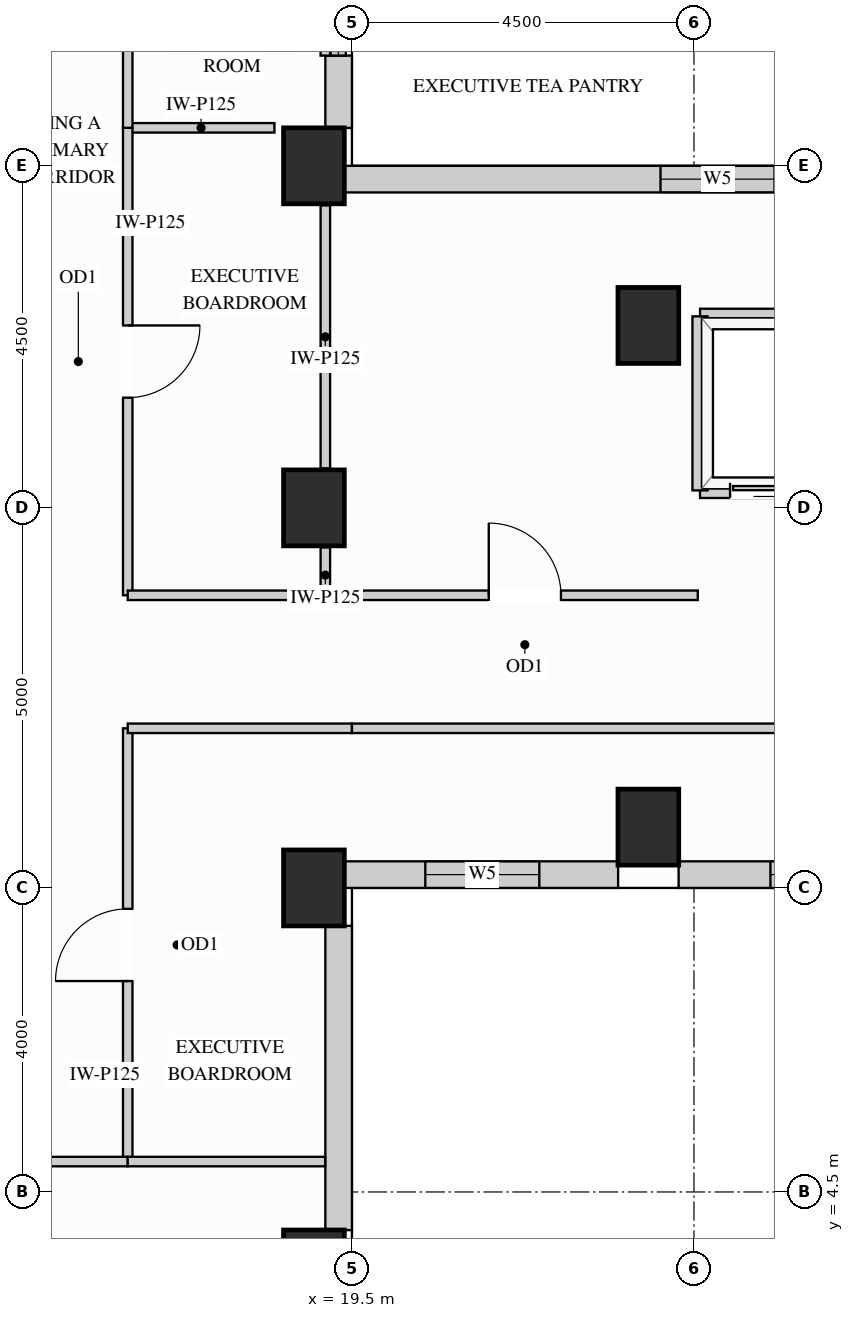
"""IFC4 building model, lengths in metres.
Left out: names, types, materials, properties, quantities, classifications, styles, units other than length and angle.
Written with IfcOpenShell. Run it as: python <this file> out.ifc"""

import sys

from ifc_helpers import new_model, si_unit, direction, frame, frame_2d, origin, origin_2d, place, context, subcontext, project, spatial, rectangle, extrude, source, transform, mapped, element, fill, save


model = new_model("IFC4")
c1 = context("Model", 3, precision=1e-05, world=origin(), true_north=direction((0.0, 1.0)))
c2 = subcontext(c1, "Body", "Model", "MODEL_VIEW")
j1 = project(units=[si_unit("LENGTHUNIT", "METRE"), si_unit("PLANEANGLEUNIT", "RADIAN")], contexts=[c1])
p1 = place(None, origin())
s1 = spatial("IfcSite", under=j1, at=p1, CompositionType="ELEMENT")
p2 = place(p1, origin())
s2 = spatial("IfcBuilding", under=s1, at=p2, CompositionType="ELEMENT")
p3 = place(p2, frame((0.0, 0.0, 153.9)))
s3 = spatial("IfcBuildingStorey", under=s2, at=p3, CompositionType="ELEMENT", Elevation=153.9)
m1 = source(origin(), c2, "Body", "SweptSolid", [
    extrude(rectangle(XDim=0.8, YDim=1.0, at=origin_2d()), origin(), (0.0, 0.0, 1.0), 3.4),
])
for number, where, z_axis, x_axis in (
    (1, (19.0, 13.5, 0.0), (0.0, 0.0, 1.0), (1.0, 0.0, 0.0)),
    (2, (19.0, 18.0, 0.0), (0.0, 0.0, 1.0), (1.0, 0.0, 0.0)),
    (3, (19.0, 3.5, 0.0), (0.0, 0.0, 1.0), (1.0, 0.0, 0.0)),
    (4, (19.0, 8.5, 0.0), (0.0, 0.0, 1.0), (1.0, 0.0, 0.0)),
    (5, (23.4, 15.9, 0.0), (0.0, 0.0, 1.0), (1.0, 0.0, 0.0)),
    (6, (23.4, 9.3, 0.0), (0.0, 0.0, 1.0), (1.0, 0.0, 0.0)),
):
    element("IfcColumn", number, at=place(p3, frame(where, z_axis=z_axis, x_axis=x_axis)), inside=s3, PredefinedType="COLUMN", context=c2, shape_type="MappedRepresentation", body=[
        mapped(m1, transform((0.0, 0.0, 0.0), x_axis=(1.0, 0.0, 0.0), y_axis=(0.0, 1.0, 0.0), z_axis=(0.0, 0.0, 1.0))),
    ])
m2 = source(origin(), c2, "Body", "SweptSolid", [
    extrude(rectangle(XDim=4.004, YDim=0.35, at=frame_2d((2.002, 0.0))), origin(), (0.0, 0.0, 1.0), 2.612),
])
p4 = place(p3, frame((19.325, 3.998, 0.0), z_axis=(0.0, 0.0, 1.0), x_axis=(0.0, 1.0, 0.0)))
e7 = element("IfcWall", 7, at=p4, inside=s3, PredefinedType="SOLIDWALL", context=c2, shape_type="MappedRepresentation", body=[
    mapped(m2, transform((0.0, 0.0, 0.0), x_axis=(1.0, 0.0, 0.0), y_axis=(0.0, 1.0, 0.0), z_axis=(0.0, 0.0, 1.0))),
])
p5 = place(p3, frame((19.398, 8.675, 0.0), z_axis=(0.0, 0.0, 1.0), x_axis=(1.0, 0.0, 0.0)))
e8 = element("IfcWall", 8, at=p5, inside=s3, PredefinedType="SOLIDWALL", context=c2, shape_type="SweptSolid", body=[
    extrude(rectangle(XDim=3.604, YDim=0.35, at=frame_2d((1.802, 0.0))), origin(), (0.0, 0.0, 1.0), 3.385),
])
p6 = place(p5, frame((1.067, 0.0, 0.78)))
e9 = element("IfcOpeningElement", 9, at=p6, cuts=e8, PredefinedType="OPENING", context=c2, shape_type="SweptSolid", body=[
    extrude(rectangle(XDim=1.5, YDim=2.0, at=frame_2d((0.75, 1.0))), frame((0.0, 0.185, 0.0), z_axis=(0.0, -1.0, 0.0), x_axis=(1.0, 0.0, 0.0)), (0.0, 0.0, 1.0), 0.37),
])
p7 = place(p3, frame((23.798, 8.675, 0.0), z_axis=(0.0, 0.0, 1.0), x_axis=(1.0, 0.0, 0.0)))
e10 = element("IfcWall", 10, at=p7, inside=s3, PredefinedType="SOLIDWALL", context=c2, shape_type="SweptSolid", body=[
    extrude(rectangle(XDim=6.304, YDim=0.35, at=frame_2d((3.152, 0.0))), origin(), (0.0, 0.0, 1.0), 3.385),
])
p8 = place(p7, frame((1.208, 0.0, 0.78)))
e11 = element("IfcOpeningElement", 11, at=p8, cuts=e10, PredefinedType="OPENING", context=c2, shape_type="SweptSolid", body=[
    extrude(rectangle(XDim=1.5, YDim=2.0, at=frame_2d((0.75, 1.0))), frame((0.0, 0.185, 0.0), z_axis=(0.0, -1.0, 0.0), x_axis=(1.0, 0.0, 0.0)), (0.0, 0.0, 1.0), 0.37),
])
p9 = place(p7, frame((3.596, 0.0, 0.78)))
e12 = element("IfcOpeningElement", 12, at=p9, cuts=e10, PredefinedType="OPENING", context=c2, shape_type="SweptSolid", body=[
    extrude(rectangle(XDim=1.5, YDim=2.0, at=frame_2d((0.75, 1.0))), frame((0.0, 0.185, 0.0), z_axis=(0.0, -1.0, 0.0), x_axis=(1.0, 0.0, 0.0)), (0.0, 0.0, 1.0), 0.37),
])
p10 = place(p3, frame((34.502, 17.825, 0.0), z_axis=(0.0, 0.0, 1.0), x_axis=(-1.0, 0.0, 0.0)))
e13 = element("IfcWall", 13, at=p10, inside=s3, PredefinedType="SOLIDWALL", context=c2, shape_type="SweptSolid", body=[
    extrude(rectangle(XDim=15.104, YDim=0.35, at=frame_2d((7.552, 0.0))), origin(), (0.0, 0.0, 1.0), 3.385),
])
p11 = place(p10, frame((4.131, 0.0, 0.78)))
e14 = element("IfcOpeningElement", 14, at=p11, cuts=e13, PredefinedType="OPENING", context=c2, shape_type="SweptSolid", body=[
    extrude(rectangle(XDim=1.5, YDim=2.0, at=frame_2d((0.75, 1.0))), frame((0.0, 0.185, 0.0), z_axis=(0.0, -1.0, 0.0), x_axis=(1.0, 0.0, 0.0)), (0.0, 0.0, 1.0), 0.37),
])
p12 = place(p10, frame((9.442, 0.0, 0.78)))
e15 = element("IfcOpeningElement", 15, at=p12, cuts=e13, PredefinedType="OPENING", context=c2, shape_type="SweptSolid", body=[
    extrude(rectangle(XDim=1.5, YDim=2.0, at=frame_2d((0.75, 1.0))), frame((0.0, 0.185, 0.0), z_axis=(0.0, -1.0, 0.0), x_axis=(1.0, 0.0, 0.0)), (0.0, 0.0, 1.0), 0.37),
])
m3 = source(origin(), c2, "Body", "SweptSolid", [
    extrude(rectangle(XDim=0.952, YDim=0.35, at=frame_2d((0.476, 0.0))), origin(), (0.0, 0.0, 1.0), 2.612),
])
p13 = place(p3, frame((19.325, 18.498, 0.0), z_axis=(0.0, 0.0, 1.0), x_axis=(0.0, 1.0, 0.0)))
e16 = element("IfcWall", 16, at=p13, inside=s3, PredefinedType="SOLIDWALL", context=c2, shape_type="MappedRepresentation", body=[
    mapped(m3, transform((0.0, 0.0, 0.0), x_axis=(1.0, 0.0, 0.0), y_axis=(0.0, 1.0, 0.0), z_axis=(0.0, 0.0, 1.0))),
])
m4 = source(origin(), c2, "Body", "SweptSolid", [
    extrude(rectangle(XDim=1.93, YDim=0.125, at=frame_2d((0.965, 0.0))), origin(), (0.0, 0.0, 1.0), 3.385),
])
p14 = place(p3, frame((16.55, 18.5, 0.0), z_axis=(0.0, 0.0, 1.0), x_axis=(1.0, 0.0, 0.0)))
e17 = element("IfcWall", 17, at=p14, inside=s3, PredefinedType="PARTITIONING", context=c2, shape_type="MappedRepresentation", body=[
    mapped(m4, transform((0.0, 0.0, 0.0), x_axis=(1.0, 0.0, 0.0), y_axis=(0.0, 1.0, 0.0), z_axis=(0.0, 0.0, 1.0))),
])
m5 = source(origin(), c2, "Body", "SweptSolid", [
    extrude(rectangle(XDim=0.63, YDim=0.125, at=frame_2d((0.315, 0.0))), origin(), (0.0, 0.0, 1.0), 2.773),
])
p15 = place(p3, frame((19.15, 12.35, 0.0), z_axis=(0.0, 0.0, 1.0), x_axis=(0.0, 1.0, 0.0)))
e18 = element("IfcWall", 18, at=p15, inside=s3, PredefinedType="PARTITIONING", context=c2, shape_type="MappedRepresentation", body=[
    mapped(m5, transform((0.0, 0.0, 0.0), x_axis=(1.0, 0.0, 0.0), y_axis=(0.0, 1.0, 0.0), z_axis=(0.0, 0.0, 1.0))),
])
m6 = source(origin(), c2, "Body", "SweptSolid", [
    extrude(rectangle(XDim=3.46, YDim=0.125, at=frame_2d((1.73, 0.0))), origin(), (0.0, 0.0, 1.0), 2.773),
])
p16 = place(p3, frame((19.15, 14.02, 0.0), z_axis=(0.0, 0.0, 1.0), x_axis=(0.0, 1.0, 0.0)))
e19 = element("IfcWall", 19, at=p16, inside=s3, PredefinedType="PARTITIONING", context=c2, shape_type="MappedRepresentation", body=[
    mapped(m6, transform((0.0, 0.0, 0.0), x_axis=(1.0, 0.0, 0.0), y_axis=(0.0, 1.0, 0.0), z_axis=(0.0, 0.0, 1.0))),
])
m7 = source(origin(), c2, "Body", "SweptSolid", [
    extrude(rectangle(XDim=2.05, YDim=0.125, at=frame_2d((1.025, 0.0))), origin(), (0.0, 0.0, 1.0), 2.612),
])
p17 = place(p3, frame((19.15, 19.45, 0.0), z_axis=(0.0, 0.0, 1.0), x_axis=(0.0, 1.0, 0.0)))
e20 = element("IfcWall", 20, at=p17, inside=s3, PredefinedType="PARTITIONING", context=c2, shape_type="MappedRepresentation", body=[
    mapped(m7, transform((0.0, 0.0, 0.0), x_axis=(1.0, 0.0, 0.0), y_axis=(0.0, 1.0, 0.0), z_axis=(0.0, 0.0, 1.0))),
])
p18 = place(p3, frame((16.55, 12.35, 0.0), z_axis=(0.0, 0.0, 1.0), x_axis=(0.0, 1.0, 0.0)))
e21 = element("IfcWall", 21, at=p18, inside=s3, PredefinedType="PARTITIONING", context=c2, shape_type="SweptSolid", body=[
    extrude(rectangle(XDim=6.15, YDim=0.125, at=frame_2d((3.075, 0.0))), origin(), (0.0, 0.0, 1.0), 3.385),
])
p19 = place(p18, frame((2.6, 0.0, 0.0)))
e22 = element("IfcOpeningElement", 22, at=p19, cuts=e21, PredefinedType="OPENING", context=c2, shape_type="SweptSolid", body=[
    extrude(rectangle(XDim=0.95, YDim=2.15, at=frame_2d((0.475, 1.075))), frame((0.0, 0.073, 0.0), z_axis=(0.0, -1.0, 0.0), x_axis=(1.0, 0.0, 0.0)), (0.0, 0.0, 1.0), 0.145),
])
p20 = place(p3, frame((16.55, 18.5, 0.0), z_axis=(0.0, 0.0, 1.0), x_axis=(0.0, 1.0, 0.0)))
e23 = element("IfcWall", 23, at=p20, inside=s3, PredefinedType="PARTITIONING", context=c2, shape_type="SweptSolid", body=[
    extrude(rectangle(XDim=4.85, YDim=0.125, at=frame_2d((2.425, 0.0))), origin(), (0.0, 0.0, 1.0), 3.385),
])
p21 = place(p20, frame((1.95, 0.0, 0.0)))
e24 = element("IfcOpeningElement", 24, at=p21, cuts=e23, PredefinedType="OPENING", context=c2, shape_type="SweptSolid", body=[
    extrude(rectangle(XDim=0.95, YDim=2.15, at=frame_2d((0.475, 1.075))), frame((0.0, 0.073, 0.0), z_axis=(0.0, -1.0, 0.0), x_axis=(1.0, 0.0, 0.0)), (0.0, 0.0, 1.0), 0.145),
])
p22 = place(p3, frame((16.55, 4.9, 0.0), z_axis=(0.0, 0.0, 1.0), x_axis=(0.0, 1.0, 0.0)))
e25 = element("IfcWall", 25, at=p22, inside=s3, PredefinedType="PARTITIONING", context=c2, shape_type="SweptSolid", body=[
    extrude(rectangle(XDim=5.7, YDim=0.125, at=frame_2d((2.85, 0.0))), origin(), (0.0, 0.0, 1.0), 3.385),
])
p23 = place(p22, frame((2.375, 0.0, 0.0)))
e26 = element("IfcOpeningElement", 26, at=p23, cuts=e25, PredefinedType="OPENING", context=c2, shape_type="SweptSolid", body=[
    extrude(rectangle(XDim=0.95, YDim=2.15, at=frame_2d((0.475, 1.075))), frame((0.0, 0.073, 0.0), z_axis=(0.0, -1.0, 0.0), x_axis=(1.0, 0.0, 0.0)), (0.0, 0.0, 1.0), 0.145),
])
m8 = source(origin(), c2, "Body", "SweptSolid", [
    extrude(rectangle(XDim=2.95, YDim=0.125, at=frame_2d((1.475, 0.0))), origin(), (0.0, 0.0, 1.0), 3.385),
])
p24 = place(p3, frame((16.55, 12.35, 0.0), z_axis=(0.0, 0.0, 1.0), x_axis=(1.0, 0.0, 0.0)))
e27 = element("IfcWall", 27, at=p24, inside=s3, PredefinedType="PARTITIONING", context=c2, shape_type="MappedRepresentation", body=[
    mapped(m8, transform((0.0, 0.0, 0.0), x_axis=(1.0, 0.0, 0.0), y_axis=(0.0, 1.0, 0.0), z_axis=(0.0, 0.0, 1.0))),
])
p25 = place(p3, frame((19.5, 12.35, 0.0), z_axis=(0.0, 0.0, 1.0), x_axis=(1.0, 0.0, 0.0)))
e28 = element("IfcWall", 28, at=p25, inside=s3, PredefinedType="PARTITIONING", context=c2, shape_type="SweptSolid", body=[
    extrude(rectangle(XDim=4.55, YDim=0.125, at=frame_2d((2.275, 0.0))), origin(), (0.0, 0.0, 1.0), 3.385),
])
p26 = place(p25, frame((1.8, 0.0, 0.0)))
e29 = element("IfcOpeningElement", 29, at=p26, cuts=e28, PredefinedType="OPENING", context=c2, shape_type="SweptSolid", body=[
    extrude(rectangle(XDim=0.95, YDim=2.15, at=frame_2d((0.475, 1.075))), frame((0.0, 0.073, 0.0), z_axis=(0.0, -1.0, 0.0), x_axis=(1.0, 0.0, 0.0)), (0.0, 0.0, 1.0), 0.145),
])
p27 = place(p3, frame((16.55, 10.6, 0.0), z_axis=(0.0, 0.0, 1.0), x_axis=(1.0, 0.0, 0.0)))
e30 = element("IfcWall", 30, at=p27, inside=s3, PredefinedType="PARTITIONING", context=c2, shape_type="MappedRepresentation", body=[
    mapped(m8, transform((0.0, 0.0, 0.0), x_axis=(1.0, 0.0, 0.0), y_axis=(0.0, 1.0, 0.0), z_axis=(0.0, 0.0, 1.0))),
])
p28 = place(p3, frame((19.5, 10.6, 0.0), z_axis=(0.0, 0.0, 1.0), x_axis=(1.0, 0.0, 0.0)))
e31 = element("IfcWall", 31, at=p28, inside=s3, PredefinedType="PARTITIONING", context=c2, shape_type="SweptSolid", body=[
    extrude(rectangle(XDim=14.9, YDim=0.125, at=frame_2d((7.45, 0.0))), origin(), (0.0, 0.0, 1.0), 3.385),
])
p29 = place(p28, frame((6.975, 0.0, 0.0)))
e32 = element("IfcOpeningElement", 32, at=p29, cuts=e31, PredefinedType="OPENING", context=c2, shape_type="SweptSolid", body=[
    extrude(rectangle(XDim=0.95, YDim=2.15, at=frame_2d((0.475, 1.075))), frame((0.0, 0.073, 0.0), z_axis=(0.0, -1.0, 0.0), x_axis=(1.0, 0.0, 0.0)), (0.0, 0.0, 1.0), 0.145),
])
p30 = place(p3, frame((10.213, 4.9, 0.0), z_axis=(0.0, 0.0, 1.0), x_axis=(1.0, 0.0, 0.0)))
e33 = element("IfcWall", 33, at=p30, inside=s3, PredefinedType="PARTITIONING", context=c2, shape_type="SweptSolid", body=[
    extrude(rectangle(XDim=6.337, YDim=0.125, at=frame_2d((3.168, 0.0))), origin(), (0.0, 0.0, 1.0), 2.848),
])
p31 = place(p30, frame((2.694, 0.0, 0.0)))
e34 = element("IfcOpeningElement", 34, at=p31, cuts=e33, PredefinedType="OPENING", context=c2, shape_type="SweptSolid", body=[
    extrude(rectangle(XDim=0.95, YDim=2.15, at=frame_2d((0.475, 1.075))), frame((0.0, 0.073, 0.0), z_axis=(0.0, -1.0, 0.0), x_axis=(1.0, 0.0, 0.0)), (0.0, 0.0, 1.0), 0.145),
])
m9 = source(origin(), c2, "Body", "SweptSolid", [
    extrude(rectangle(XDim=2.598, YDim=0.125, at=frame_2d((1.299, 0.0))), origin(), (0.0, 0.0, 1.0), 2.848),
])
p32 = place(p3, frame((16.55, 4.9, 0.0), z_axis=(0.0, 0.0, 1.0), x_axis=(1.0, 0.0, 0.0)))
e35 = element("IfcWall", 35, at=p32, inside=s3, PredefinedType="PARTITIONING", context=c2, shape_type="MappedRepresentation", body=[
    mapped(m9, transform((0.0, 0.0, 0.0), x_axis=(1.0, 0.0, 0.0), y_axis=(0.0, 1.0, 0.0), z_axis=(0.0, 0.0, 1.0))),
])
m10 = source(origin(), c2, "Body", "SweptSolid", [
    extrude(rectangle(XDim=1.89, YDim=0.2, at=frame_2d((0.945, 0.0))), origin(), (0.0, 0.0, 1.0), 2.773),
])
p33 = place(p3, frame((24.08, 16.02, 0.0), z_axis=(0.0, 0.0, 1.0), x_axis=(1.0, 0.0, 0.0)))
e36 = element("IfcWall", 36, at=p33, inside=s3, PredefinedType="PARTITIONING", context=c2, shape_type="MappedRepresentation", body=[
    mapped(m10, transform((0.0, 0.0, 0.0), x_axis=(1.0, 0.0, 0.0), y_axis=(0.0, 1.0, 0.0), z_axis=(0.0, 0.0, 1.0))),
])
p34 = place(p3, frame((24.08, 13.73, 0.0), z_axis=(0.0, 0.0, 1.0), x_axis=(1.0, 0.0, 0.0)))
e37 = element("IfcWall", 37, at=p34, inside=s3, PredefinedType="PARTITIONING", context=c2, shape_type="SweptSolid", body=[
    extrude(rectangle(XDim=1.89, YDim=0.2, at=frame_2d((0.945, 0.0))), origin(), (0.0, 0.0, 1.0), 2.466),
])
p35 = place(p34, frame((0.395, 0.0, 0.0)))
e38 = element("IfcOpeningElement", 38, at=p35, cuts=e37, PredefinedType="OPENING", context=c2, shape_type="SweptSolid", body=[
    extrude(rectangle(XDim=1.1, YDim=2.2, at=frame_2d((0.55, 1.1))), frame((0.0, 0.11, 0.0), z_axis=(0.0, -1.0, 0.0), x_axis=(1.0, 0.0, 0.0)), (0.0, 0.0, 1.0), 0.22),
])
m11 = source(origin(), c2, "Body", "SweptSolid", [
    extrude(rectangle(XDim=2.29, YDim=0.2, at=frame_2d((1.145, 0.0))), origin(), (0.0, 0.0, 1.0), 3.385),
])
p36 = place(p3, frame((24.08, 13.73, 0.0), z_axis=(0.0, 0.0, 1.0), x_axis=(0.0, 1.0, 0.0)))
e39 = element("IfcWall", 39, at=p36, inside=s3, PredefinedType="PARTITIONING", context=c2, shape_type="MappedRepresentation", body=[
    mapped(m11, transform((0.0, 0.0, 0.0), x_axis=(1.0, 0.0, 0.0), y_axis=(0.0, 1.0, 0.0), z_axis=(0.0, 0.0, 1.0))),
])
m12 = source(origin(), c2, "Body", "SweptSolid", [
    extrude(rectangle(XDim=1.1, YDim=2.2, at=frame_2d((0.55, 1.1))), frame((0.0, 0.025, 0.0), z_axis=(0.0, -1.0, 0.0), x_axis=(1.0, 0.0, 0.0)), (0.0, 0.0, 1.0), 0.05),
])
p37 = place(p35, origin())
e40 = element("IfcDoor", 40, at=p37, inside=s3, OperationType="SLIDING_TO_LEFT", PredefinedType="DOOR", context=c2, shape_type="MappedRepresentation", body=[
    mapped(m12, transform((0.0, 0.0, 0.0), x_axis=(1.0, 0.0, 0.0), y_axis=(0.0, 1.0, 0.0), z_axis=(0.0, 0.0, 1.0))),
])
fill(e38, e40)
m13 = source(origin(), c2, "Body", "SweptSolid", [
    extrude(rectangle(XDim=0.95, YDim=2.15, at=frame_2d((0.475, 1.075))), frame((0.0, 0.025, 0.0), z_axis=(0.0, -1.0, 0.0), x_axis=(1.0, 0.0, 0.0)), (0.0, 0.0, 1.0), 0.05),
])
p38 = place(p23, origin())
e41 = element("IfcDoor", 41, at=p38, inside=s3, OperationType="SINGLE_SWING_LEFT", PredefinedType="DOOR", context=c2, shape_type="MappedRepresentation", body=[
    mapped(m13, transform((0.0, 0.0, 0.0), x_axis=(1.0, 0.0, 0.0), y_axis=(0.0, 1.0, 0.0), z_axis=(0.0, 0.0, 1.0))),
])
fill(e26, e41)
p39 = place(p19, origin())
e42 = element("IfcDoor", 42, at=p39, inside=s3, OperationType="SINGLE_SWING_RIGHT", PredefinedType="DOOR", context=c2, shape_type="MappedRepresentation", body=[
    mapped(m13, transform((0.0, 0.0, 0.0), x_axis=(1.0, 0.0, 0.0), y_axis=(0.0, 1.0, 0.0), z_axis=(0.0, 0.0, 1.0))),
])
fill(e22, e42)
p40 = place(p26, origin())
e43 = element("IfcDoor", 43, at=p40, inside=s3, OperationType="SINGLE_SWING_LEFT", PredefinedType="DOOR", context=c2, shape_type="MappedRepresentation", body=[
    mapped(m13, transform((0.0, 0.0, 0.0), x_axis=(1.0, 0.0, 0.0), y_axis=(0.0, 1.0, 0.0), z_axis=(0.0, 0.0, 1.0))),
])
fill(e29, e43)
m14 = source(origin(), c2, "Body", "SweptSolid", [
    extrude(rectangle(XDim=1.5, YDim=2.0, at=frame_2d((0.75, 1.0))), frame((0.0, 0.03, 0.0), z_axis=(0.0, -1.0, 0.0), x_axis=(1.0, 0.0, 0.0)), (0.0, 0.0, 1.0), 0.06),
])
p41 = place(p6, origin())
e44 = element("IfcWindow", 44, at=p41, inside=s3, PartitioningType="SINGLE_PANEL", PredefinedType="WINDOW", context=c2, shape_type="MappedRepresentation", body=[
    mapped(m14, transform((0.0, 0.0, 0.0), x_axis=(1.0, 0.0, 0.0), y_axis=(0.0, 1.0, 0.0), z_axis=(0.0, 0.0, 1.0))),
])
fill(e9, e44)
p42 = place(p8, origin())
e45 = element("IfcWindow", 45, at=p42, inside=s3, PartitioningType="SINGLE_PANEL", PredefinedType="WINDOW", context=c2, shape_type="MappedRepresentation", body=[
    mapped(m14, transform((0.0, 0.0, 0.0), x_axis=(1.0, 0.0, 0.0), y_axis=(0.0, 1.0, 0.0), z_axis=(0.0, 0.0, 1.0))),
])
fill(e11, e45)
p43 = place(p12, origin())
e46 = element("IfcWindow", 46, at=p43, inside=s3, PartitioningType="SINGLE_PANEL", PredefinedType="WINDOW", context=c2, shape_type="MappedRepresentation", body=[
    mapped(m14, transform((0.0, 0.0, 0.0), x_axis=(1.0, 0.0, 0.0), y_axis=(0.0, 1.0, 0.0), z_axis=(0.0, 0.0, 1.0))),
])
fill(e15, e46)
save(model, sys.argv[1])
